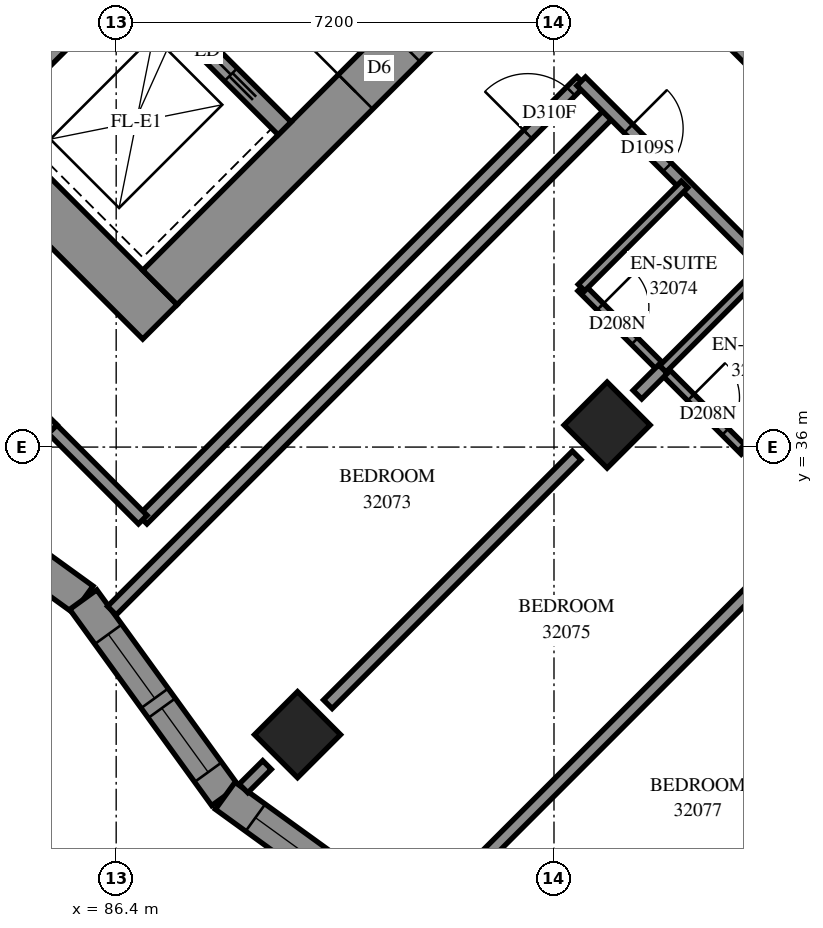
"""IFC4 building model, lengths in metres.
Left out: names, types, materials, properties, quantities, classifications, styles, units other than length and angle.
Written with IfcOpenShell. Run it as: python <this file> out.ifc"""

import sys

from ifc_helpers import new_model, si_unit, direction, frame, frame_2d, origin, origin_2d, place, context, subcontext, project, spatial, polyline, rectangle, outline, extrude, element, fill, save


model = new_model("IFC4")
c1 = context("Model", 3, precision=1e-05, world=origin(), true_north=direction((0.0, 1.0)))
c2 = subcontext(c1, "Body", "Model", "MODEL_VIEW")
j1 = project(units=[si_unit("LENGTHUNIT", "METRE"), si_unit("PLANEANGLEUNIT", "RADIAN")], contexts=[c1])
p1 = place(None, origin())
s1 = spatial("IfcSite", under=j1, at=p1, CompositionType="ELEMENT")
p2 = place(p1, origin())
s2 = spatial("IfcBuilding", under=s1, at=p2, CompositionType="ELEMENT")
p3 = place(p2, frame((0.0, 0.0, 118.6)))
s3 = spatial("IfcBuildingStorey", under=s2, at=p3, CompositionType="ELEMENT", Elevation=118.6)
for number, where, z_axis, x_axis in (
    (1, (94.474, 36.362, 0.0), (0.0, 0.0, 1.0), (0.707, -0.707, 0.0)),
    (2, (89.382, 31.271, 0.0), (0.0, 0.0, 1.0), (0.707, -0.707, 0.0)),
):
    element("IfcColumn", number, at=place(p3, frame(where, z_axis=z_axis, x_axis=x_axis)), inside=s3, PredefinedType="COLUMN", context=c2, shape_type="SweptSolid", body=[
        extrude(rectangle(XDim=1.0, YDim=1.0, at=origin_2d()), origin(), (0.0, 0.0, 1.0), 3.1),
    ])
p4 = place(p3, frame((75.806, 49.373, -0.3), z_axis=(0.0, 0.0, 1.0), x_axis=(0.7071067812, -0.7071067812, 0.0)))
e3 = element("IfcWall", 3, at=p4, inside=s3, PredefinedType="SHEAR", context=c2, shape_type="SweptSolid", body=[
    extrude(rectangle(XDim=16.0, YDim=0.8, at=frame_2d((8.0, 0.0))), origin(), (0.0, 0.0, 1.0), 2.7),
])
p5 = place(p3, frame((87.12, 38.625, -0.3), z_axis=(0.0, 0.0, 1.0), x_axis=(0.7071067812, 0.7071067812, 0.0)))
e4 = element("IfcWall", 4, at=p5, inside=s3, PredefinedType="SHEAR", context=c2, shape_type="SweptSolid", body=[
    extrude(rectangle(XDim=14.4, YDim=0.8, at=frame_2d((7.2, 0.0))), origin(), (0.0, 0.0, 1.0), 2.7),
])
p6 = place(p5, frame((4.55, 0.0, 0.3)))
e5 = element("IfcOpeningElement", 5, at=p6, cuts=e4, PredefinedType="OPENING", context=c2, shape_type="SweptSolid", body=[
    extrude(rectangle(XDim=1.1, YDim=2.1, at=frame_2d((0.55, 1.05))), frame((0.0, 0.41, 0.0), z_axis=(0.0, -1.0, 0.0), x_axis=(1.0, 0.0, 0.0)), (0.0, 0.0, 1.0), 0.82),
])
p7 = place(p5, frame((11.35, 0.0, 0.3)))
e6 = element("IfcOpeningElement", 6, at=p7, cuts=e4, PredefinedType="OPENING", context=c2, shape_type="SweptSolid", body=[
    extrude(rectangle(XDim=1.1, YDim=2.1, at=frame_2d((0.55, 1.05))), frame((0.0, 0.41, 0.0), z_axis=(0.0, -1.0, 0.0), x_axis=(1.0, 0.0, 0.0)), (0.0, 0.0, 1.0), 0.82),
])
p8 = place(p3, frame((84.291, 41.453, 0.0), z_axis=(0.0, 0.0, 1.0), x_axis=(0.7071067812, 0.7071067812, 0.0)))
e7 = element("IfcWall", 7, at=p8, inside=s3, PredefinedType="SOLIDWALL", context=c2, shape_type="SweptSolid", body=[
    extrude(rectangle(XDim=3.3, YDim=0.3, at=frame_2d((1.65, 0.0))), origin(), (0.0, 0.0, 1.0), 3.1),
])
p9 = place(p3, frame((78.988, 51.423, 0.0), z_axis=(0.0, 0.0, 1.0), x_axis=(0.7071067812, -0.7071067812, 0.0)))
e8 = element("IfcWall", 8, at=p9, inside=s3, PredefinedType="SOLIDWALL", context=c2, shape_type="SweptSolid", body=[
    extrude(rectangle(XDim=14.4, YDim=0.3, at=frame_2d((7.2, 0.0))), origin(), (0.0, 0.0, 1.0), 3.1),
])
p10 = place(p9, frame((1.25, 0.0, 0.0)))
e9 = element("IfcOpeningElement", 9, at=p10, cuts=e8, PredefinedType="OPENING", context=c2, shape_type="SweptSolid", body=[
    extrude(rectangle(XDim=1.1, YDim=2.1, at=frame_2d((0.55, 1.05))), frame((0.0, 0.16, 0.0), z_axis=(0.0, -1.0, 0.0), x_axis=(1.0, 0.0, 0.0)), (0.0, 0.0, 1.0), 0.32),
])
p11 = place(p9, frame((4.85, 0.0, 0.0)))
e10 = element("IfcOpeningElement", 10, at=p11, cuts=e8, PredefinedType="OPENING", context=c2, shape_type="SweptSolid", body=[
    extrude(rectangle(XDim=1.1, YDim=2.1, at=frame_2d((0.55, 1.05))), frame((0.0, 0.16, 0.0), z_axis=(0.0, -1.0, 0.0), x_axis=(1.0, 0.0, 0.0)), (0.0, 0.0, 1.0), 0.32),
])
p12 = place(p9, frame((8.45, 0.0, 0.0)))
e11 = element("IfcOpeningElement", 11, at=p12, cuts=e8, PredefinedType="OPENING", context=c2, shape_type="SweptSolid", body=[
    extrude(rectangle(XDim=1.1, YDim=2.1, at=frame_2d((0.55, 1.05))), frame((0.0, 0.16, 0.0), z_axis=(0.0, -1.0, 0.0), x_axis=(1.0, 0.0, 0.0)), (0.0, 0.0, 1.0), 0.32),
])
p13 = place(p9, frame((12.05, 0.0, 0.0)))
e12 = element("IfcOpeningElement", 12, at=p13, cuts=e8, PredefinedType="OPENING", context=c2, shape_type="SweptSolid", body=[
    extrude(rectangle(XDim=1.1, YDim=2.1, at=frame_2d((0.55, 1.05))), frame((0.0, 0.16, 0.0), z_axis=(0.0, -1.0, 0.0), x_axis=(1.0, 0.0, 0.0)), (0.0, 0.0, 1.0), 0.32),
])
p14 = place(p3, frame((82.632, 35.827, 0.0), z_axis=(0.0, 0.0, 1.0), x_axis=(0.8100630266, -0.5863428119, 0.0)))
e13 = element("IfcWall", 13, at=p14, inside=s3, PredefinedType="SOLIDWALL", context=c2, shape_type="SweptSolid", body=[
    extrude(outline(polyline([(-0.044, -0.275), (3.939, -0.275), (4.027, 0.275), (0.044, 0.275), (-0.044, -0.275)])), origin(), (0.0, 0.0, 1.0), 3.1),
])
p15 = place(p14, frame((1.694, 0.0, 0.5)))
e14 = element("IfcOpeningElement", 14, at=p15, cuts=e13, PredefinedType="OPENING", context=c2, shape_type="SweptSolid", body=[
    extrude(rectangle(XDim=1.2, YDim=2.45, at=frame_2d((0.6, 1.225))), frame((0.0, 0.285, 0.0), z_axis=(0.0, -1.0, 0.0), x_axis=(1.0, 0.0, 0.0)), (0.0, 0.0, 1.0), 0.57),
])
p16 = place(p3, frame((85.858, 33.492, 0.0), z_axis=(0.0, 0.0, 1.0), x_axis=(0.5863547381, -0.8100543939, 0.0)))
e15 = element("IfcWall", 15, at=p16, inside=s3, PredefinedType="SOLIDWALL", context=c2, shape_type="SweptSolid", body=[
    extrude(outline(polyline([(0.044, -0.275), (4.027, -0.275), (3.939, 0.275), (-0.044, 0.275), (0.044, -0.275)])), origin(), (0.0, 0.0, 1.0), 3.1),
])
p17 = place(p16, frame((0.704, 0.0, 0.5)))
e16 = element("IfcOpeningElement", 16, at=p17, cuts=e15, PredefinedType="OPENING", context=c2, shape_type="SweptSolid", body=[
    extrude(rectangle(XDim=1.3, YDim=2.45, at=frame_2d((0.65, 1.225))), frame((0.0, 0.285, 0.0), z_axis=(0.0, -1.0, 0.0), x_axis=(1.0, 0.0, 0.0)), (0.0, 0.0, 1.0), 0.57),
])
p18 = place(p16, frame((2.204, 0.0, 0.5)))
e17 = element("IfcOpeningElement", 17, at=p18, cuts=e15, PredefinedType="OPENING", context=c2, shape_type="SweptSolid", body=[
    extrude(rectangle(XDim=1.3, YDim=2.45, at=frame_2d((0.65, 1.225))), frame((0.0, 0.285, 0.0), z_axis=(0.0, -1.0, 0.0), x_axis=(1.0, 0.0, 0.0)), (0.0, 0.0, 1.0), 0.57),
])
p19 = place(p3, frame((88.193, 30.265, 0.0), z_axis=(0.0, 0.0, 1.0), x_axis=(0.8100630266, -0.5863428119, 0.0)))
e18 = element("IfcWall", 18, at=p19, inside=s3, PredefinedType="SOLIDWALL", context=c2, shape_type="SweptSolid", body=[
    extrude(outline(polyline([(-0.044, -0.275), (3.939, -0.275), (4.027, 0.275), (0.044, 0.275), (-0.044, -0.275)])), origin(), (0.0, 0.0, 1.0), 3.1),
])
p20 = place(p19, frame((0.613, 0.0, 0.5)))
e19 = element("IfcOpeningElement", 19, at=p20, cuts=e18, PredefinedType="OPENING", context=c2, shape_type="SweptSolid", body=[
    extrude(rectangle(XDim=1.3, YDim=2.45, at=frame_2d((0.65, 1.225))), frame((0.0, 0.285, 0.0), z_axis=(0.0, -1.0, 0.0), x_axis=(1.0, 0.0, 0.0)), (0.0, 0.0, 1.0), 0.57),
])
p21 = place(p19, frame((2.113, 0.0, 0.5)))
e20 = element("IfcOpeningElement", 20, at=p21, cuts=e18, PredefinedType="OPENING", context=c2, shape_type="SweptSolid", body=[
    extrude(rectangle(XDim=1.3, YDim=2.45, at=frame_2d((0.65, 1.225))), frame((0.0, 0.285, 0.0), z_axis=(0.0, -1.0, 0.0), x_axis=(1.0, 0.0, 0.0)), (0.0, 0.0, 1.0), 0.57),
])
p22 = place(p3, frame((96.465, 23.082, 0.0), z_axis=(0.0, 0.0, 1.0), x_axis=(0.707016895, 0.7071966559, 0.0)))
e21 = element("IfcWall", 21, at=p22, inside=s3, PredefinedType="PARTITIONING", context=c2, shape_type="SweptSolid", body=[
    extrude(rectangle(XDim=11.682, YDim=0.2, at=frame_2d((5.841, 0.0))), origin(), (0.0, 0.0, 1.0), 3.1),
])
p23 = place(p3, frame((86.329, 33.31, 0.0), z_axis=(0.0, 0.0, 1.0), x_axis=(0.7071067812, 0.7071067812, 0.0)))
e22 = element("IfcWall", 22, at=p23, inside=s3, PredefinedType="PARTITIONING", context=c2, shape_type="SweptSolid", body=[
    extrude(rectangle(XDim=11.617, YDim=0.2, at=frame_2d((5.808, 0.0))), origin(), (0.0, 0.0, 1.0), 3.1),
])
p24 = place(p3, frame((91.45, 28.248, 0.0), z_axis=(0.0, 0.0, 1.0), x_axis=(0.7071931644, 0.7070203875, 0.0)))
e23 = element("IfcWall", 23, at=p24, inside=s3, PredefinedType="PARTITIONING", context=c2, shape_type="SweptSolid", body=[
    extrude(rectangle(XDim=11.576, YDim=0.2, at=frame_2d((5.788, 0.0))), origin(), (0.0, 0.0, 1.0), 3.1),
])
p25 = place(p3, frame((86.835, 34.806, 0.0), z_axis=(0.0, 0.0, 1.0), x_axis=(0.7071067812, 0.7071067812, 0.0)))
e24 = element("IfcWall", 24, at=p25, inside=s3, PredefinedType="PARTITIONING", context=c2, shape_type="SweptSolid", body=[
    extrude(rectangle(XDim=10.201, YDim=0.2, at=frame_2d((5.1, 0.0))), origin(), (0.0, 0.0, 1.0), 3.1),
])
p26 = place(p25, frame((8.959, 0.0, 0.0)))
e25 = element("IfcOpeningElement", 25, at=p26, cuts=e24, PredefinedType="OPENING", context=c2, shape_type="SweptSolid", body=[
    extrude(rectangle(XDim=1.0, YDim=2.1, at=frame_2d((0.5, 1.05))), frame((0.0, 0.11, 0.0), z_axis=(0.0, -1.0, 0.0), x_axis=(1.0, 0.0, 0.0)), (0.0, 0.0, 1.0), 0.22),
])
p27 = place(p3, frame((94.047, 42.015, 0.0), z_axis=(0.0, 0.0, 1.0), x_axis=(0.7071067812, -0.7071067812, 0.0)))
e26 = element("IfcWall", 26, at=p27, inside=s3, PredefinedType="PARTITIONING", context=c2, shape_type="SweptSolid", body=[
    extrude(rectangle(XDim=9.6, YDim=0.2, at=frame_2d((4.8, 0.0))), origin(), (0.0, 0.0, 1.0), 3.1),
])
p28 = place(p27, frame((1.099, 0.0, 0.0)))
e27 = element("IfcOpeningElement", 27, at=p28, cuts=e26, PredefinedType="OPENING", context=c2, shape_type="SweptSolid", body=[
    extrude(rectangle(XDim=0.9, YDim=2.1, at=frame_2d((0.45, 1.05))), frame((0.0, 0.11, 0.0), z_axis=(0.0, -1.0, 0.0), x_axis=(1.0, 0.0, 0.0)), (0.0, 0.0, 1.0), 0.22),
])
p29 = place(p27, frame((6.649, 0.0, 0.0)))
e28 = element("IfcOpeningElement", 28, at=p29, cuts=e26, PredefinedType="OPENING", context=c2, shape_type="SweptSolid", body=[
    extrude(rectangle(XDim=0.9, YDim=2.1, at=frame_2d((0.45, 1.05))), frame((0.0, 0.11, 0.0), z_axis=(0.0, -1.0, 0.0), x_axis=(1.0, 0.0, 0.0)), (0.0, 0.0, 1.0), 0.22),
])
p30 = place(p27, frame((8.3, 0.0, 0.0)))
e29 = element("IfcOpeningElement", 29, at=p30, cuts=e26, PredefinedType="OPENING", context=c2, shape_type="SweptSolid", body=[
    extrude(rectangle(XDim=0.9, YDim=2.1, at=frame_2d((0.45, 1.05))), frame((0.0, 0.11, 0.0), z_axis=(0.0, -1.0, 0.0), x_axis=(1.0, 0.0, 0.0)), (0.0, 0.0, 1.0), 0.22),
])
p31 = place(p3, frame((96.103, 43.083, 0.0), z_axis=(0.0, 0.0, 1.0), x_axis=(0.7071067812, -0.7071067812, 0.0)))
e30 = element("IfcWall", 30, at=p31, inside=s3, PredefinedType="PARTITIONING", context=c2, shape_type="SweptSolid", body=[
    extrude(rectangle(XDim=8.491, YDim=0.2, at=frame_2d((4.245, 0.0))), origin(), (0.0, 0.0, 1.0), 3.1),
])
p32 = place(p31, frame((1.995, 0.0, 0.0)))
e31 = element("IfcOpeningElement", 31, at=p32, cuts=e30, PredefinedType="OPENING", context=c2, shape_type="SweptSolid", body=[
    extrude(rectangle(XDim=0.9, YDim=2.1, at=frame_2d((0.45, 1.05))), frame((0.0, 0.11, 0.0), z_axis=(0.0, -1.0, 0.0), x_axis=(1.0, 0.0, 0.0)), (0.0, 0.0, 1.0), 0.22),
])
p33 = place(p31, frame((4.27, 0.0, 0.0)))
e32 = element("IfcOpeningElement", 32, at=p33, cuts=e30, PredefinedType="OPENING", context=c2, shape_type="SweptSolid", body=[
    extrude(rectangle(XDim=0.9, YDim=2.1, at=frame_2d((0.45, 1.05))), frame((0.0, 0.11, 0.0), z_axis=(0.0, -1.0, 0.0), x_axis=(1.0, 0.0, 0.0)), (0.0, 0.0, 1.0), 0.22),
])
p34 = place(p3, frame((89.881, 31.771, 0.0), z_axis=(0.0, 0.0, 1.0), x_axis=(0.7071067812, 0.7071067812, 0.0)))
e33 = element("IfcWall", 33, at=p34, inside=s3, PredefinedType="PARTITIONING", context=c2, shape_type="SweptSolid", body=[
    extrude(rectangle(XDim=5.787, YDim=0.2, at=frame_2d((2.893, 0.0))), origin(), (0.0, 0.0, 1.0), 3.1),
])
p35 = place(p3, frame((94.973, 26.681, 0.0), z_axis=(0.0, 0.0, 1.0), x_axis=(0.7071067812, 0.7071067812, 0.0)))
e34 = element("IfcWall", 34, at=p35, inside=s3, PredefinedType="PARTITIONING", context=c2, shape_type="SweptSolid", body=[
    extrude(rectangle(XDim=5.784, YDim=0.2, at=frame_2d((2.892, 0.0))), origin(), (0.0, 0.0, 1.0), 2.6),
])
p36 = place(p3, frame((94.047, 38.621, 0.0), z_axis=(0.0, 0.0, 1.0), x_axis=(0.7071067812, -0.7071067812, 0.0)))
e35 = element("IfcWall", 35, at=p36, inside=s3, PredefinedType="PARTITIONING", context=c2, shape_type="SweptSolid", body=[
    extrude(rectangle(XDim=3.799, YDim=0.15, at=frame_2d((1.899, 0.0))), origin(), (0.0, 0.0, 1.0), 3.1),
])
p37 = place(p36, frame((0.444, 0.0, 0.0)))
e36 = element("IfcOpeningElement", 36, at=p37, cuts=e35, PredefinedType="OPENING", context=c2, shape_type="SweptSolid", body=[
    extrude(rectangle(XDim=0.8, YDim=2.1, at=frame_2d((0.4, 1.05))), frame((0.0, 0.085, 0.0), z_axis=(0.0, -1.0, 0.0), x_axis=(1.0, 0.0, 0.0)), (0.0, 0.0, 1.0), 0.17),
])
p38 = place(p36, frame((2.551, 0.0, 0.0)))
e37 = element("IfcOpeningElement", 37, at=p38, cuts=e35, PredefinedType="OPENING", context=c2, shape_type="SweptSolid", body=[
    extrude(rectangle(XDim=0.8, YDim=2.1, at=frame_2d((0.4, 1.05))), frame((0.0, 0.085, 0.0), z_axis=(0.0, -1.0, 0.0), x_axis=(1.0, 0.0, 0.0)), (0.0, 0.0, 1.0), 0.17),
])
for number, where, z_axis, x_axis in (
    (38, (95.389, 37.285, 0.0), (0.0, 0.0, 1.0), (0.708, 0.707, 0.0)),
    (39, (94.052, 38.622, 0.0), (0.0, 0.0, 1.0), (0.707, 0.708, 0.0)),
    (40, (96.739, 35.935, 0.0), (0.0, 0.0, 1.0), (0.708, 0.707, 0.0)),
):
    element("IfcWall", number, at=place(p3, frame(where, z_axis=z_axis, x_axis=x_axis)), inside=s3, PredefinedType="PARTITIONING", context=c2, shape_type="SweptSolid", body=[
        extrude(rectangle(XDim=2.4, YDim=0.15, at=frame_2d((1.2, 0.0))), origin(), (0.0, 0.0, 1.0), 3.1),
    ])
p39 = place(p3, frame((85.353, 36.293, 0.0), z_axis=(0.0, 0.0, 1.0), x_axis=(0.7066304548, -0.7075827869, 0.0)))
e41 = element("IfcWall", 41, at=p39, inside=s3, PredefinedType="PARTITIONING", context=c2, shape_type="SweptSolid", body=[
    extrude(rectangle(XDim=2.1, YDim=0.2, at=frame_2d((1.05, 0.0))), origin(), (0.0, 0.0, 1.0), 3.1),
])
p40 = place(p3, frame((84.795, 36.855, 0.0), z_axis=(0.0, 0.0, 1.0), x_axis=(0.7071067812, -0.7071067812, 0.0)))
e42 = element("IfcWall", 42, at=p40, inside=s3, PredefinedType="PARTITIONING", context=c2, shape_type="SweptSolid", body=[
    extrude(rectangle(XDim=0.792, YDim=0.2, at=frame_2d((0.396, 0.0))), origin(), (0.0, 0.0, 1.0), 3.1),
])
p41 = place(p3, frame((94.972, 36.862, 0.0), z_axis=(0.0, 0.0, 1.0), x_axis=(0.7071067812, 0.7071067812, 0.0)))
e43 = element("IfcWall", 43, at=p41, inside=s3, PredefinedType="PARTITIONING", context=c2, shape_type="SweptSolid", body=[
    extrude(rectangle(XDim=0.594, YDim=0.2, at=frame_2d((0.297, 0.0))), origin(), (0.0, 0.0, 1.0), 3.1),
])
p42 = place(p3, frame((88.494, 30.388, 0.0), z_axis=(0.0, 0.0, 1.0), x_axis=(0.709396765, 0.7048093571, 0.0)))
e44 = element("IfcWall", 44, at=p42, inside=s3, PredefinedType="PARTITIONING", context=c2, shape_type="SweptSolid", body=[
    extrude(rectangle(XDim=0.545, YDim=0.2, at=frame_2d((0.273, 0.0))), origin(), (0.0, 0.0, 1.0), 3.1),
])
p43 = place(p17, origin())
e45 = element("IfcWindow", 45, at=p43, inside=s3, PartitioningType="SINGLE_PANEL", PredefinedType="WINDOW", context=c2, shape_type="SweptSolid", body=[
    extrude(rectangle(XDim=1.3, YDim=2.45, at=frame_2d((0.65, 1.225))), frame((0.0, 0.155, 0.0), z_axis=(0.0, -1.0, 0.0), x_axis=(1.0, 0.0, 0.0)), (0.0, 0.0, 1.0), 0.06),
])
fill(e16, e45)
p44 = place(p18, origin())
e46 = element("IfcWindow", 46, at=p44, inside=s3, PartitioningType="SINGLE_PANEL", PredefinedType="WINDOW", context=c2, shape_type="SweptSolid", body=[
    extrude(rectangle(XDim=1.3, YDim=2.45, at=frame_2d((0.65, 1.225))), frame((0.0, 0.155, 0.0), z_axis=(0.0, -1.0, 0.0), x_axis=(1.0, 0.0, 0.0)), (0.0, 0.0, 1.0), 0.06),
])
fill(e17, e46)
p45 = place(p20, origin())
e47 = element("IfcWindow", 47, at=p45, inside=s3, PartitioningType="SINGLE_PANEL", PredefinedType="WINDOW", context=c2, shape_type="SweptSolid", body=[
    extrude(rectangle(XDim=1.3, YDim=2.45, at=frame_2d((0.65, 1.225))), frame((0.0, 0.155, 0.0), z_axis=(0.0, -1.0, 0.0), x_axis=(1.0, 0.0, 0.0)), (0.0, 0.0, 1.0), 0.06),
])
fill(e19, e47)
p46 = place(p6, origin())
e48 = element("IfcDoor", 48, at=p46, inside=s3, OperationType="DOUBLE_DOOR_SINGLE_SWING", PredefinedType="DOOR", context=c2, shape_type="SweptSolid", body=[
    extrude(rectangle(XDim=1.1, YDim=2.1, at=frame_2d((0.55, 1.05))), frame((0.0, 0.025, 0.0), z_axis=(0.0, -1.0, 0.0), x_axis=(1.0, 0.0, 0.0)), (0.0, 0.0, 1.0), 0.05),
])
fill(e5, e48)
p47 = place(p13, origin())
e49 = element("IfcDoor", 49, at=p47, inside=s3, OperationType="SLIDING_TO_RIGHT", PredefinedType="DOOR", context=c2, shape_type="SweptSolid", body=[
    extrude(rectangle(XDim=1.1, YDim=2.1, at=frame_2d((0.55, 1.05))), frame((0.0, 0.025, 0.0), z_axis=(0.0, -1.0, 0.0), x_axis=(1.0, 0.0, 0.0)), (0.0, 0.0, 1.0), 0.05),
])
fill(e12, e49)
p48 = place(p26, origin())
e50 = element("IfcDoor", 50, at=p48, inside=s3, OperationType="SINGLE_SWING_LEFT", PredefinedType="DOOR", context=c2, shape_type="SweptSolid", body=[
    extrude(rectangle(XDim=1.0, YDim=2.1, at=frame_2d((0.5, 1.05))), frame((0.0, 0.025, 0.0), z_axis=(0.0, -1.0, 0.0), x_axis=(1.0, 0.0, 0.0)), (0.0, 0.0, 1.0), 0.05),
])
fill(e25, e50)
p49 = place(p28, origin())
e51 = element("IfcDoor", 51, at=p49, inside=s3, OperationType="SINGLE_SWING_LEFT", PredefinedType="DOOR", context=c2, shape_type="SweptSolid", body=[
    extrude(rectangle(XDim=0.9, YDim=2.1, at=frame_2d((0.45, 1.05))), frame((0.0, 0.025, 0.0), z_axis=(0.0, -1.0, 0.0), x_axis=(1.0, 0.0, 0.0)), (0.0, 0.0, 1.0), 0.05),
])
fill(e27, e51)
p50 = place(p37, origin())
e52 = element("IfcDoor", 52, at=p50, inside=s3, OperationType="SINGLE_SWING_RIGHT", PredefinedType="DOOR", context=c2, shape_type="SweptSolid", body=[
    extrude(rectangle(XDim=0.8, YDim=2.1, at=frame_2d((0.4, 1.05))), frame((0.0, 0.025, 0.0), z_axis=(0.0, -1.0, 0.0), x_axis=(1.0, 0.0, 0.0)), (0.0, 0.0, 1.0), 0.05),
])
fill(e36, e52)
p51 = place(p38, origin())
e53 = element("IfcDoor", 53, at=p51, inside=s3, OperationType="SINGLE_SWING_RIGHT", PredefinedType="DOOR", context=c2, shape_type="SweptSolid", body=[
    extrude(rectangle(XDim=0.8, YDim=2.1, at=frame_2d((0.4, 1.05))), frame((0.0, 0.025, 0.0), z_axis=(0.0, -1.0, 0.0), x_axis=(1.0, 0.0, 0.0)), (0.0, 0.0, 1.0), 0.05),
])
fill(e37, e53)
save(model, sys.argv[1])
